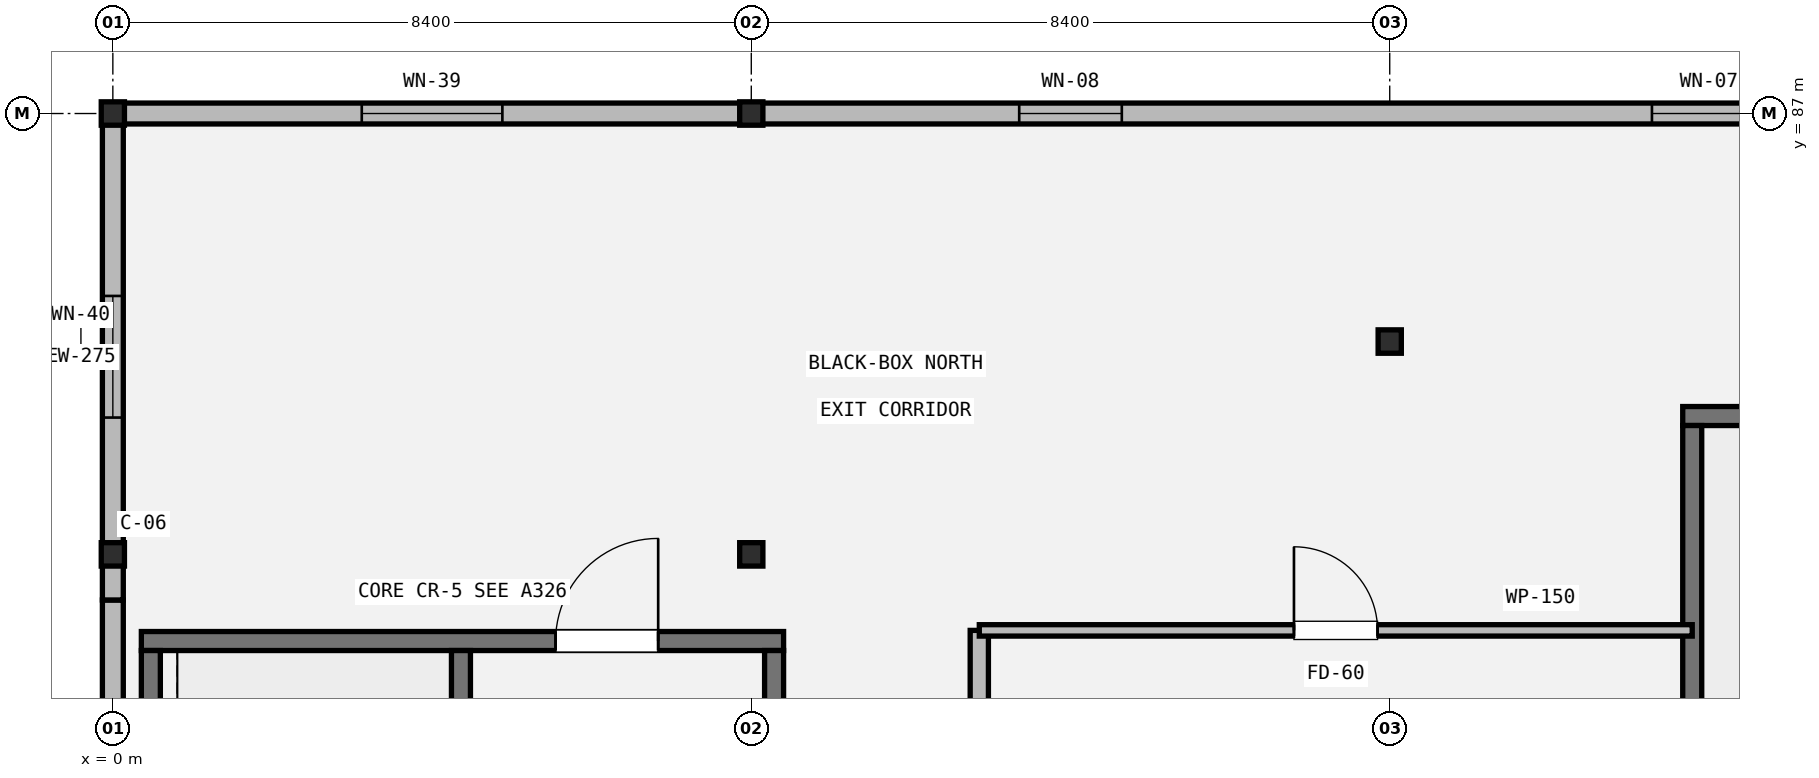
"""IFC4 building model, lengths in metres.
Left out: names, types, materials, properties, quantities, classifications, styles, units other than length and angle.
Written with IfcOpenShell. Run it as: python <this file> out.ifc"""

import sys

from ifc_helpers import new_model, si_unit, direction, frame, frame_2d, origin, origin_2d, place, context, subcontext, project, spatial, rectangle, i_section, extrude, element, fill, save


model = new_model("IFC4")
c1 = context("Model", 3, precision=1e-05, world=origin(), true_north=direction((0.0, 1.0)))
c2 = subcontext(c1, "Body", "Model", "MODEL_VIEW")
j1 = project(units=[si_unit("LENGTHUNIT", "METRE"), si_unit("PLANEANGLEUNIT", "RADIAN")], contexts=[c1])
p1 = place(None, origin())
s1 = spatial("IfcSite", under=j1, at=p1, CompositionType="ELEMENT")
p2 = place(p1, origin())
s2 = spatial("IfcBuilding", under=s1, at=p2, CompositionType="ELEMENT")
p3 = place(p2, frame((0.0, 0.0, 5.4)))
s3 = spatial("IfcBuildingStorey", under=s2, at=p3, CompositionType="ELEMENT", Elevation=5.4)
for number, where, z_axis, x_axis in (
    (1, (0.0, 81.2, 0.0), (0.0, 0.0, 1.0), (1.0, 0.0, 0.0)),
    (2, (0.0, 87.0, 0.0), (0.0, 0.0, 1.0), (1.0, 0.0, 0.0)),
    (3, (8.4, 81.2, 0.0), (0.0, 0.0, 1.0), (1.0, 0.0, 0.0)),
    (4, (8.4, 87.0, 0.0), (0.0, 0.0, 1.0), (1.0, 0.0, 0.0)),
    (5, (16.8, 84.0, 0.0), (0.0, 0.0, 1.0), (1.0, 0.0, 0.0)),
):
    element("IfcColumn", number, at=place(p3, frame(where, z_axis=z_axis, x_axis=x_axis)), inside=s3, PredefinedType="COLUMN", context=c2, shape_type="SweptSolid", body=[
        extrude(i_section(OverallWidth=0.305, OverallDepth=0.308, WebThickness=0.01, FlangeThickness=0.015, FilletRadius=0.015, at=origin_2d()), origin(), (0.0, 0.0, 1.0), 4.8),
    ])
p4 = place(p3, frame((0.0, 69.3, 0.0), z_axis=(0.0, 0.0, 1.0), x_axis=(0.0, 1.0, 0.0)))
e6 = element("IfcWall", 6, at=p4, inside=s3, PredefinedType="STANDARD", context=c2, shape_type="SweptSolid", body=[
    extrude(rectangle(XDim=11.3, YDim=0.275, at=frame_2d((5.65, 0.0))), origin(), (0.0, 0.0, 1.0), 3.955),
])
p5 = place(p3, frame((0.0, 80.6, 0.0), z_axis=(0.0, 0.0, 1.0), x_axis=(0.0, 1.0, 0.0)))
e7 = element("IfcWall", 7, at=p5, inside=s3, PredefinedType="STANDARD", context=c2, shape_type="SweptSolid", body=[
    extrude(rectangle(XDim=6.4, YDim=0.275, at=frame_2d((3.2, 0.0))), origin(), (0.0, 0.0, 1.0), 3.955),
])
p6 = place(p5, frame((2.4, 0.0, 0.9)))
e8 = element("IfcOpeningElement", 8, at=p6, cuts=e7, PredefinedType="OPENING", context=c2, shape_type="SweptSolid", body=[
    extrude(rectangle(XDim=1.6, YDim=2.2, at=frame_2d((0.8, 1.1))), frame((0.0, 0.147, 0.0), z_axis=(0.0, -1.0, 0.0), x_axis=(1.0, 0.0, 0.0)), (0.0, 0.0, 1.0), 0.295),
])
p7 = place(p3, frame((0.0, 87.0, 0.0), z_axis=(0.0, 0.0, 1.0), x_axis=(1.0, 0.0, 0.0)))
e9 = element("IfcWall", 9, at=p7, inside=s3, PredefinedType="STANDARD", context=c2, shape_type="SweptSolid", body=[
    extrude(rectangle(XDim=25.2, YDim=0.275, at=frame_2d((12.6, 0.0))), origin(), (0.0, 0.0, 1.0), 3.721),
])
p8 = place(p7, frame((3.275, 0.0, 0.9)))
e10 = element("IfcOpeningElement", 10, at=p8, cuts=e9, PredefinedType="OPENING", context=c2, shape_type="SweptSolid", body=[
    extrude(rectangle(XDim=1.85, YDim=2.2, at=frame_2d((0.925, 1.1))), frame((0.0, 0.147, 0.0), z_axis=(0.0, -1.0, 0.0), x_axis=(1.0, 0.0, 0.0)), (0.0, 0.0, 1.0), 0.295),
])
p9 = place(p7, frame((11.925, 0.0, 0.9)))
e11 = element("IfcOpeningElement", 11, at=p9, cuts=e9, PredefinedType="OPENING", context=c2, shape_type="SweptSolid", body=[
    extrude(rectangle(XDim=1.35, YDim=1.8, at=frame_2d((0.675, 0.9))), frame((0.0, 0.147, 0.0), z_axis=(0.0, -1.0, 0.0), x_axis=(1.0, 0.0, 0.0)), (0.0, 0.0, 1.0), 0.295),
])
p10 = place(p7, frame((20.25, 0.0, 0.9)))
e12 = element("IfcOpeningElement", 12, at=p10, cuts=e9, PredefinedType="OPENING", context=c2, shape_type="SweptSolid", body=[
    extrude(rectangle(XDim=1.5, YDim=1.8, at=frame_2d((0.75, 0.9))), frame((0.0, 0.147, 0.0), z_axis=(0.0, -1.0, 0.0), x_axis=(1.0, 0.0, 0.0)), (0.0, 0.0, 1.0), 0.295),
])
p11 = place(p3, frame((20.655, 83.02, 0.0), z_axis=(0.0, 0.0, 1.0), x_axis=(1.0, 0.0, 0.0)))
e13 = element("IfcWall", 13, at=p11, inside=s3, PredefinedType="SHEAR", context=c2, shape_type="SweptSolid", body=[
    extrude(rectangle(XDim=3.99, YDim=0.25, at=frame_2d((1.995, 0.0))), origin(), (0.0, 0.0, 1.0), 4.58),
])
p12 = place(p3, frame((20.78, 72.245, 0.0), z_axis=(0.0, 0.0, 1.0), x_axis=(0.0, 1.0, 0.0)))
e14 = element("IfcWall", 14, at=p12, inside=s3, PredefinedType="SHEAR", context=c2, shape_type="SweptSolid", body=[
    extrude(rectangle(XDim=10.65, YDim=0.25, at=frame_2d((5.325, 0.0))), origin(), (0.0, 0.0, 1.0), 4.58),
])
p13 = place(p12, frame((0.55, 0.0, 0.0)))
e15 = element("IfcOpeningElement", 15, at=p13, cuts=e14, PredefinedType="OPENING", context=c2, shape_type="SweptSolid", body=[
    extrude(rectangle(XDim=1.1, YDim=2.15, at=frame_2d((0.55, 1.075))), frame((0.0, 0.135, 0.0), z_axis=(0.0, -1.0, 0.0), x_axis=(1.0, 0.0, 0.0)), (0.0, 0.0, 1.0), 0.27),
])
p14 = place(p3, frame((0.375, 80.06, 0.0), z_axis=(0.0, 0.0, 1.0), x_axis=(1.0, 0.0, 0.0)))
e16 = element("IfcWall", 16, at=p14, inside=s3, PredefinedType="SHEAR", context=c2, shape_type="SweptSolid", body=[
    extrude(rectangle(XDim=8.45, YDim=0.25, at=frame_2d((4.225, 0.0))), origin(), (0.0, 0.0, 1.0), 4.58),
])
p15 = place(p14, frame((5.45, 0.0, 0.0)))
e17 = element("IfcOpeningElement", 17, at=p15, cuts=e16, PredefinedType="OPENING", context=c2, shape_type="SweptSolid", body=[
    extrude(rectangle(XDim=1.35, YDim=2.15, at=frame_2d((0.675, 1.075))), frame((0.0, 0.135, 0.0), z_axis=(0.0, -1.0, 0.0), x_axis=(1.0, 0.0, 0.0)), (0.0, 0.0, 1.0), 0.27),
])
for number, where, z_axis, x_axis in (
    (18, (0.5, 69.925, 0.0), (0.0, 0.0, 1.0), (0.0, 1.0, 0.0)),
    (19, (8.7, 79.935, 0.0), (0.0, 0.0, 1.0), (0.0, -1.0, 0.0)),
):
    element("IfcWall", number, at=place(p3, frame(where, z_axis=z_axis, x_axis=x_axis)), inside=s3, PredefinedType="SHEAR", context=c2, shape_type="SweptSolid", body=[
        extrude(rectangle(XDim=10.01, YDim=0.25, at=frame_2d((5.005, 0.0))), origin(), (0.0, 0.0, 1.0), 4.58),
    ])
p16 = place(p3, frame((4.58, 79.935, 0.0), z_axis=(0.0, 0.0, 1.0), x_axis=(0.0, -1.0, 0.0)))
e20 = element("IfcWall", 20, at=p16, inside=s3, PredefinedType="SHEAR", context=c2, shape_type="SweptSolid", body=[
    extrude(rectangle(XDim=10.01, YDim=0.25, at=frame_2d((5.005, 0.0))), origin(), (0.0, 0.0, 1.0), 4.58),
])
p17 = place(p16, frame((8.36, 0.0, 0.0)))
e21 = element("IfcOpeningElement", 21, at=p17, cuts=e20, PredefinedType="OPENING", context=c2, shape_type="SweptSolid", body=[
    extrude(rectangle(XDim=1.1, YDim=2.15, at=frame_2d((0.55, 1.075))), frame((0.0, 0.135, 0.0), z_axis=(0.0, -1.0, 0.0), x_axis=(1.0, 0.0, 0.0)), (0.0, 0.0, 1.0), 0.27),
])
p18 = place(p3, frame((11.4, 54.74, 0.0), z_axis=(0.0, 0.0, 1.0), x_axis=(0.0, 1.0, 0.0)))
e22 = element("IfcWall", 22, at=p18, inside=s3, PredefinedType="PARTITIONING", context=c2, shape_type="SweptSolid", body=[
    extrude(rectangle(XDim=25.46, YDim=0.24, at=frame_2d((12.73, 0.0))), origin(), (0.0, 0.0, 1.0), 4.039),
])
p19 = place(p18, frame((8.229, 0.0, 0.0)))
e23 = element("IfcOpeningElement", 23, at=p19, cuts=e22, PredefinedType="OPENING", context=c2, shape_type="SweptSolid", body=[
    extrude(rectangle(XDim=1.95, YDim=2.35, at=frame_2d((0.975, 1.175))), frame((0.0, 0.13, 0.0), z_axis=(0.0, -1.0, 0.0), x_axis=(1.0, 0.0, 0.0)), (0.0, 0.0, 1.0), 0.26),
])
p20 = place(p3, frame((11.4, 80.2, 0.0), z_axis=(0.0, 0.0, 1.0), x_axis=(1.0, 0.0, 0.0)))
e24 = element("IfcWall", 24, at=p20, inside=s3, PredefinedType="PARTITIONING", context=c2, shape_type="SweptSolid", body=[
    extrude(rectangle(XDim=9.38, YDim=0.15, at=frame_2d((4.69, 0.0))), origin(), (0.0, 0.0, 1.0), 4.552),
])
p21 = place(p20, frame((4.14, 0.0, 0.0)))
e25 = element("IfcOpeningElement", 25, at=p21, cuts=e24, PredefinedType="OPENING", context=c2, shape_type="SweptSolid", body=[
    extrude(rectangle(XDim=1.1, YDim=2.15, at=frame_2d((0.55, 1.075))), frame((0.0, 0.085, 0.0), z_axis=(0.0, -1.0, 0.0), x_axis=(1.0, 0.0, 0.0)), (0.0, 0.0, 1.0), 0.17),
])
p22 = place(p6, origin())
e26 = element("IfcWindow", 26, at=p22, inside=s3, PartitioningType="SINGLE_PANEL", PredefinedType="WINDOW", context=c2, shape_type="SweptSolid", body=[
    extrude(rectangle(XDim=1.6, YDim=2.2, at=frame_2d((0.8, 1.1))), frame((0.0, 0.03, 0.0), z_axis=(0.0, -1.0, 0.0), x_axis=(1.0, 0.0, 0.0)), (0.0, 0.0, 1.0), 0.06),
])
fill(e8, e26)
p23 = place(p8, origin())
e27 = element("IfcWindow", 27, at=p23, inside=s3, PartitioningType="SINGLE_PANEL", PredefinedType="WINDOW", context=c2, shape_type="SweptSolid", body=[
    extrude(rectangle(XDim=1.85, YDim=2.2, at=frame_2d((0.925, 1.1))), frame((0.0, 0.03, 0.0), z_axis=(0.0, -1.0, 0.0), x_axis=(1.0, 0.0, 0.0)), (0.0, 0.0, 1.0), 0.06),
])
fill(e10, e27)
p24 = place(p9, origin())
e28 = element("IfcWindow", 28, at=p24, inside=s3, PartitioningType="SINGLE_PANEL", PredefinedType="WINDOW", context=c2, shape_type="SweptSolid", body=[
    extrude(rectangle(XDim=1.35, YDim=1.8, at=frame_2d((0.675, 0.9))), frame((0.0, 0.03, 0.0), z_axis=(0.0, -1.0, 0.0), x_axis=(1.0, 0.0, 0.0)), (0.0, 0.0, 1.0), 0.06),
])
fill(e11, e28)
p25 = place(p10, origin())
e29 = element("IfcWindow", 29, at=p25, inside=s3, PartitioningType="SINGLE_PANEL", PredefinedType="WINDOW", context=c2, shape_type="SweptSolid", body=[
    extrude(rectangle(XDim=1.5, YDim=1.8, at=frame_2d((0.75, 0.9))), frame((0.0, 0.03, 0.0), z_axis=(0.0, -1.0, 0.0), x_axis=(1.0, 0.0, 0.0)), (0.0, 0.0, 1.0), 0.06),
])
fill(e12, e29)
p26 = place(p15, origin())
e30 = element("IfcDoor", 30, at=p26, inside=s3, OperationType="SINGLE_SWING_RIGHT", PredefinedType="DOOR", context=c2, shape_type="SweptSolid", body=[
    extrude(rectangle(XDim=1.35, YDim=2.15, at=frame_2d((0.675, 1.075))), frame((0.0, 0.025, 0.0), z_axis=(0.0, -1.0, 0.0), x_axis=(1.0, 0.0, 0.0)), (0.0, 0.0, 1.0), 0.05),
])
fill(e17, e30)
p27 = place(p21, origin())
e31 = element("IfcDoor", 31, at=p27, inside=s3, OperationType="SINGLE_SWING_LEFT", PredefinedType="DOOR", context=c2, shape_type="SweptSolid", body=[
    extrude(rectangle(XDim=1.1, YDim=2.15, at=frame_2d((0.55, 1.075))), frame((0.0, 0.025, 0.0), z_axis=(0.0, -1.0, 0.0), x_axis=(1.0, 0.0, 0.0)), (0.0, 0.0, 1.0), 0.05),
])
fill(e25, e31)
save(model, sys.argv[1])
